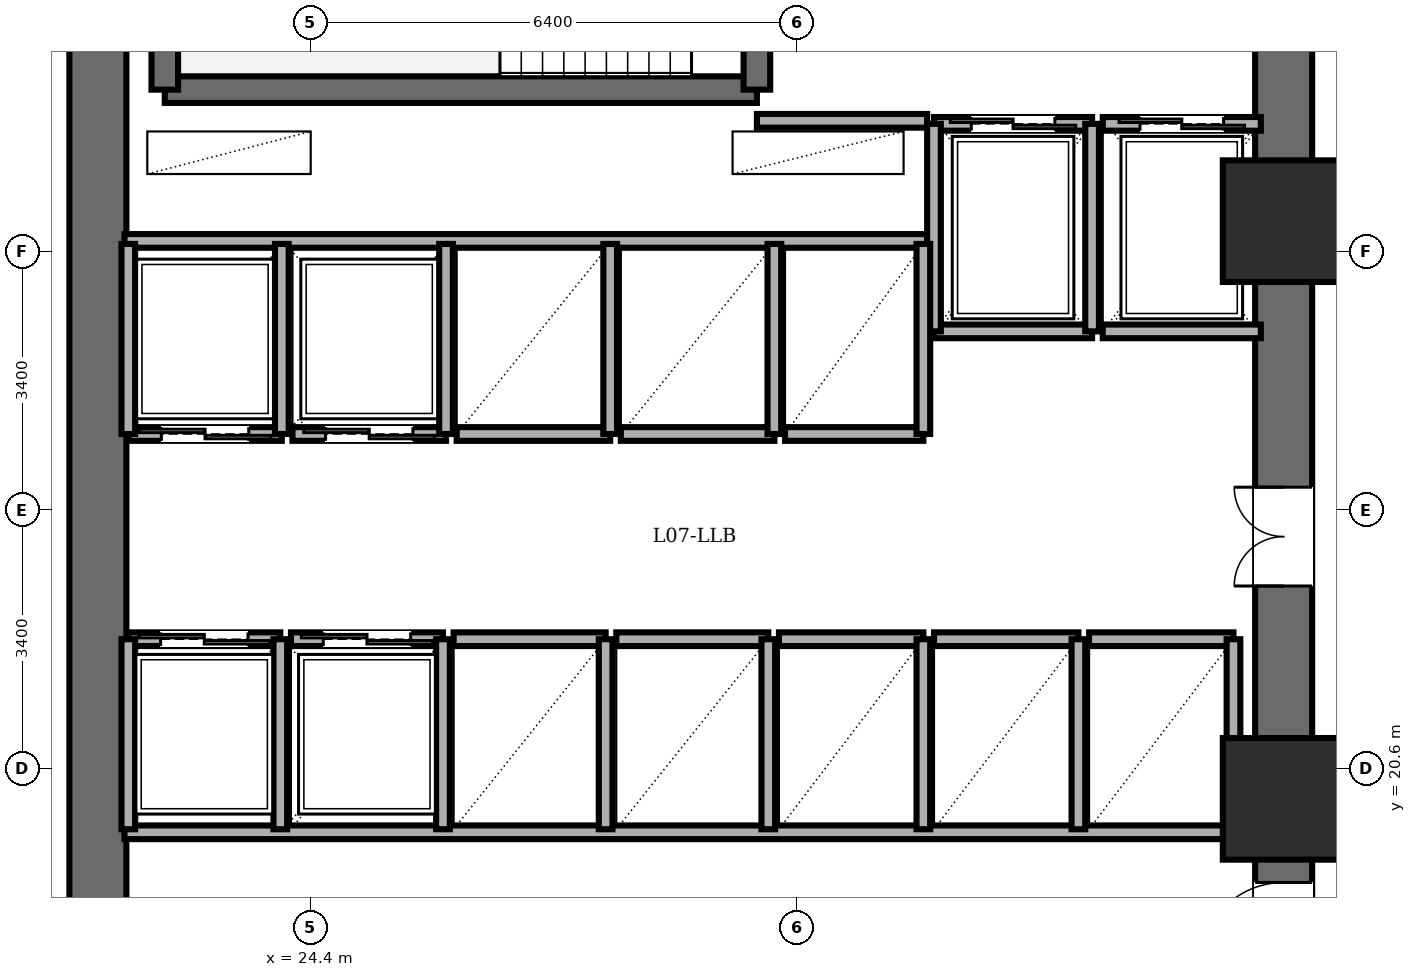
"""IFC4 building model, lengths in metres.
Left out: names, types, materials, properties, quantities, classifications, styles, units other than length and angle.
Written with IfcOpenShell. Run it as: python <this file> out.ifc"""

import sys

from ifc_helpers import new_model, si_unit, direction, frame, frame_2d, origin, origin_2d, place, context, subcontext, project, spatial, rectangle, extrude, element, fill, save


model = new_model("IFC4")
c1 = context("Model", 3, precision=1e-05, world=origin(), true_north=direction((0.0, 1.0)))
c2 = subcontext(c1, "Body", "Model", "MODEL_VIEW")
j1 = project(units=[si_unit("LENGTHUNIT", "METRE"), si_unit("PLANEANGLEUNIT", "RADIAN")], contexts=[c1])
p1 = place(None, origin())
s1 = spatial("IfcSite", under=j1, at=p1, CompositionType="ELEMENT")
p2 = place(p1, origin())
s2 = spatial("IfcBuilding", under=s1, at=p2, CompositionType="ELEMENT")
p3 = place(p2, frame((0.0, 0.0, 28.8)))
s3 = spatial("IfcBuildingStorey", under=s2, at=p3, CompositionType="ELEMENT", Elevation=28.8)
for number, where, z_axis, x_axis in (
    (1, (37.2, 20.2, 0.0), (0.0, 0.0, 1.0), (1.0, 0.0, 0.0)),
    (2, (37.2, 27.8, 0.0), (0.0, 0.0, 1.0), (1.0, 0.0, 0.0)),
):
    element("IfcColumn", number, at=place(p3, frame(where, z_axis=z_axis, x_axis=x_axis)), inside=s3, PredefinedType="COLUMN", context=c2, shape_type="SweptSolid", body=[
        extrude(rectangle(XDim=1.6, YDim=1.6, at=origin_2d()), origin(), (0.0, 0.0, 1.0), 3.6),
    ])
p4 = place(p3, frame((21.6, 14.4, 0.0), z_axis=(0.0, 0.0, 1.0), x_axis=(0.0, 1.0, 0.0)))
e3 = element("IfcWall", 3, at=p4, inside=s3, PredefinedType="SHEAR", context=c2, shape_type="SweptSolid", body=[
    extrude(rectangle(XDim=19.2, YDim=0.75, at=frame_2d((9.6, 0.0))), origin(), (0.0, 0.0, 1.0), 3.4),
])
p5 = place(p3, frame((37.2, 14.4, 0.0), z_axis=(0.0, 0.0, 1.0), x_axis=(0.0, 1.0, 0.0)))
e4 = element("IfcWall", 4, at=p5, inside=s3, PredefinedType="SHEAR", context=c2, shape_type="SweptSolid", body=[
    extrude(rectangle(XDim=19.2, YDim=0.75, at=frame_2d((9.6, 0.0))), origin(), (0.0, 0.0, 1.0), 3.4),
])
p6 = place(p5, frame((15.8, 0.0, 0.0)))
e5 = element("IfcOpeningElement", 5, at=p6, cuts=e4, PredefinedType="OPENING", context=c2, shape_type="SweptSolid", body=[
    extrude(rectangle(XDim=1.15, YDim=2.15, at=frame_2d((0.575, 1.075))), frame((0.0, 0.385, 0.0), z_axis=(0.0, -1.0, 0.0), x_axis=(1.0, 0.0, 0.0)), (0.0, 0.0, 1.0), 0.77),
])
p7 = place(p5, frame((3.6, 0.0, 0.0)))
e6 = element("IfcOpeningElement", 6, at=p7, cuts=e4, PredefinedType="OPENING", context=c2, shape_type="SweptSolid", body=[
    extrude(rectangle(XDim=1.1, YDim=2.15, at=frame_2d((0.55, 1.075))), frame((0.0, 0.385, 0.0), z_axis=(0.0, -1.0, 0.0), x_axis=(1.0, 0.0, 0.0)), (0.0, 0.0, 1.0), 0.77),
])
p8 = place(p5, frame((8.6, 0.0, 0.0)))
e7 = element("IfcOpeningElement", 7, at=p8, cuts=e4, PredefinedType="OPENING", context=c2, shape_type="SweptSolid", body=[
    extrude(rectangle(XDim=1.3, YDim=2.2, at=frame_2d((0.65, 1.1))), frame((0.0, 0.385, 0.0), z_axis=(0.0, -1.0, 0.0), x_axis=(1.0, 0.0, 0.0)), (0.0, 0.0, 1.0), 0.77),
])
p9 = place(p3, frame((22.48, 29.53, 0.0), z_axis=(0.0, 0.0, 1.0), x_axis=(1.0, 0.0, 0.0)))
e8 = element("IfcWall", 8, at=p9, inside=s3, PredefinedType="SOLIDWALL", context=c2, shape_type="SweptSolid", body=[
    extrude(rectangle(XDim=7.79, YDim=0.35, at=frame_2d((3.895, 0.0))), origin(), (0.0, 0.0, 1.0), 3.4),
])
p10 = place(p3, frame((22.48, 29.53, 0.0), z_axis=(0.0, 0.0, 1.0), x_axis=(0.0, 1.0, 0.0)))
e9 = element("IfcWall", 9, at=p10, inside=s3, PredefinedType="SOLIDWALL", context=c2, shape_type="SweptSolid", body=[
    extrude(rectangle(XDim=3.58, YDim=0.35, at=frame_2d((1.79, 0.0))), origin(), (0.0, 0.0, 1.0), 3.4),
])
p11 = place(p3, frame((30.27, 29.53, 0.0), z_axis=(0.0, 0.0, 1.0), x_axis=(0.0, 1.0, 0.0)))
e10 = element("IfcWall", 10, at=p11, inside=s3, PredefinedType="SOLIDWALL", context=c2, shape_type="SweptSolid", body=[
    extrude(rectangle(XDim=3.58, YDim=0.35, at=frame_2d((1.79, 0.0))), origin(), (0.0, 0.0, 1.0), 3.4),
])
p12 = place(p11, frame((1.25, 0.0, 0.0)))
e11 = element("IfcOpeningElement", 11, at=p12, cuts=e10, PredefinedType="OPENING", context=c2, shape_type="SweptSolid", body=[
    extrude(rectangle(XDim=1.1, YDim=2.15, at=frame_2d((0.55, 1.075))), frame((0.0, 0.185, 0.0), z_axis=(0.0, -1.0, 0.0), x_axis=(1.0, 0.0, 0.0)), (0.0, 0.0, 1.0), 0.37),
])
p13 = place(p3, frame((30.27, 29.12, 0.0), z_axis=(0.0, 0.0, 1.0), x_axis=(1.0, 0.0, 0.0)))
e12 = element("IfcWall", 12, at=p13, inside=s3, PredefinedType="PARTITIONING", context=c2, shape_type="SweptSolid", body=[
    extrude(rectangle(XDim=2.24, YDim=0.18, at=frame_2d((1.12, 0.0))), origin(), (0.0, 0.0, 1.0), 3.4),
])
p14 = place(p3, frame((21.95, 27.54, 0.0), z_axis=(0.0, 0.0, 1.0), x_axis=(1.0, 0.0, 0.0)))
e13 = element("IfcWall", 13, at=p14, inside=s3, PredefinedType="PARTITIONING", context=c2, shape_type="SweptSolid", body=[
    extrude(rectangle(XDim=10.56, YDim=0.18, at=frame_2d((5.28, 0.0))), origin(), (0.0, 0.0, 1.0), 3.4),
])
p15 = place(p3, frame((21.95, 19.76, 0.0), z_axis=(0.0, 0.0, 1.0), x_axis=(1.0, 0.0, 0.0)))
e14 = element("IfcWall", 14, at=p15, inside=s3, PredefinedType="PARTITIONING", context=c2, shape_type="SweptSolid", body=[
    extrude(rectangle(XDim=14.87, YDim=0.18, at=frame_2d((7.435, 0.0))), origin(), (0.0, 0.0, 1.0), 3.4),
])
p16 = place(p3, frame((32.6, 29.08, 0.0), z_axis=(0.0, 0.0, 1.0), x_axis=(1.0, 0.0, 0.0)))
e15 = element("IfcWall", 15, at=p16, inside=s3, PredefinedType="PARTITIONING", context=c2, shape_type="SweptSolid", body=[
    extrude(rectangle(XDim=2.08, YDim=0.18, at=frame_2d((1.04, 0.0))), origin(), (0.0, 0.0, 1.0), 3.4),
])
p17 = place(p16, frame((0.49, 0.0, 0.0)))
e16 = element("IfcOpeningElement", 16, at=p17, cuts=e15, PredefinedType="OPENING", context=c2, shape_type="SweptSolid", body=[
    extrude(rectangle(XDim=1.1, YDim=2.2, at=frame_2d((0.55, 1.1))), frame((0.0, 0.1, 0.0), z_axis=(0.0, -1.0, 0.0), x_axis=(1.0, 0.0, 0.0)), (0.0, 0.0, 1.0), 0.2),
])
p18 = place(p3, frame((34.68, 26.35, 0.0), z_axis=(0.0, 0.0, 1.0), x_axis=(-1.0, 0.0, 0.0)))
e17 = element("IfcWall", 17, at=p18, inside=s3, PredefinedType="PARTITIONING", context=c2, shape_type="SweptSolid", body=[
    extrude(rectangle(XDim=2.08, YDim=0.18, at=frame_2d((1.04, 0.0))), origin(), (0.0, 0.0, 1.0), 3.4),
])
for number, where, z_axis, x_axis in (
    (18, (34.68, 26.35, 0.0), (0.0, 0.0, 1.0), (0.0, 1.0, 0.0)),
    (19, (32.6, 29.08, 0.0), (0.0, 0.0, 1.0), (0.0, -1.0, 0.0)),
):
    element("IfcWall", number, at=place(p3, frame(where, z_axis=z_axis, x_axis=x_axis)), inside=s3, PredefinedType="PARTITIONING", context=c2, shape_type="SweptSolid", body=[
        extrude(rectangle(XDim=2.73, YDim=0.18, at=frame_2d((1.365, 0.0))), origin(), (0.0, 0.0, 1.0), 3.4),
    ])
p19 = place(p3, frame((34.82, 29.08, 0.0), z_axis=(0.0, 0.0, 1.0), x_axis=(1.0, 0.0, 0.0)))
e20 = element("IfcWall", 20, at=p19, inside=s3, PredefinedType="PARTITIONING", context=c2, shape_type="SweptSolid", body=[
    extrude(rectangle(XDim=2.08, YDim=0.18, at=frame_2d((1.04, 0.0))), origin(), (0.0, 0.0, 1.0), 3.4),
])
p20 = place(p19, frame((0.49, 0.0, 0.0)))
e21 = element("IfcOpeningElement", 21, at=p20, cuts=e20, PredefinedType="OPENING", context=c2, shape_type="SweptSolid", body=[
    extrude(rectangle(XDim=1.1, YDim=2.2, at=frame_2d((0.55, 1.1))), frame((0.0, 0.1, 0.0), z_axis=(0.0, -1.0, 0.0), x_axis=(1.0, 0.0, 0.0)), (0.0, 0.0, 1.0), 0.2),
])
p21 = place(p3, frame((36.9, 26.35, 0.0), z_axis=(0.0, 0.0, 1.0), x_axis=(-1.0, 0.0, 0.0)))
e22 = element("IfcWall", 22, at=p21, inside=s3, PredefinedType="PARTITIONING", context=c2, shape_type="SweptSolid", body=[
    extrude(rectangle(XDim=2.08, YDim=0.18, at=frame_2d((1.04, 0.0))), origin(), (0.0, 0.0, 1.0), 3.4),
])
p22 = place(p3, frame((24.02, 25.0, 0.0), z_axis=(0.0, 0.0, 1.0), x_axis=(-1.0, 0.0, 0.0)))
e23 = element("IfcWall", 23, at=p22, inside=s3, PredefinedType="PARTITIONING", context=c2, shape_type="SweptSolid", body=[
    extrude(rectangle(XDim=2.02, YDim=0.18, at=frame_2d((1.01, 0.0))), origin(), (0.0, 0.0, 1.0), 3.4),
])
p23 = place(p22, frame((0.435, 0.0, 0.0)))
e24 = element("IfcOpeningElement", 24, at=p23, cuts=e23, PredefinedType="OPENING", context=c2, shape_type="SweptSolid", body=[
    extrude(rectangle(XDim=1.15, YDim=2.2, at=frame_2d((0.575, 1.1))), frame((0.0, 0.1, 0.0), z_axis=(0.0, -1.0, 0.0), x_axis=(1.0, 0.0, 0.0)), (0.0, 0.0, 1.0), 0.2),
])
for number, where, z_axis, x_axis in (
    (25, (24.02, 25.0, 0.0), (0.0, 0.0, 1.0), (0.0, 1.0, 0.0)),
    (26, (22.0, 27.5, 0.0), (0.0, 0.0, 1.0), (0.0, -1.0, 0.0)),
):
    element("IfcWall", number, at=place(p3, frame(where, z_axis=z_axis, x_axis=x_axis)), inside=s3, PredefinedType="PARTITIONING", context=c2, shape_type="SweptSolid", body=[
        extrude(rectangle(XDim=2.5, YDim=0.18, at=frame_2d((1.25, 0.0))), origin(), (0.0, 0.0, 1.0), 3.4),
    ])
p24 = place(p3, frame((26.18, 25.0, 0.0), z_axis=(0.0, 0.0, 1.0), x_axis=(-1.0, 0.0, 0.0)))
e27 = element("IfcWall", 27, at=p24, inside=s3, PredefinedType="PARTITIONING", context=c2, shape_type="SweptSolid", body=[
    extrude(rectangle(XDim=2.02, YDim=0.18, at=frame_2d((1.01, 0.0))), origin(), (0.0, 0.0, 1.0), 3.4),
])
p25 = place(p24, frame((0.435, 0.0, 0.0)))
e28 = element("IfcOpeningElement", 28, at=p25, cuts=e27, PredefinedType="OPENING", context=c2, shape_type="SweptSolid", body=[
    extrude(rectangle(XDim=1.15, YDim=2.2, at=frame_2d((0.575, 1.1))), frame((0.0, 0.1, 0.0), z_axis=(0.0, -1.0, 0.0), x_axis=(1.0, 0.0, 0.0)), (0.0, 0.0, 1.0), 0.2),
])
p26 = place(p3, frame((26.18, 25.0, 0.0), z_axis=(0.0, 0.0, 1.0), x_axis=(0.0, 1.0, 0.0)))
e29 = element("IfcWall", 29, at=p26, inside=s3, PredefinedType="PARTITIONING", context=c2, shape_type="SweptSolid", body=[
    extrude(rectangle(XDim=2.5, YDim=0.18, at=frame_2d((1.25, 0.0))), origin(), (0.0, 0.0, 1.0), 3.4),
])
p27 = place(p3, frame((22.0, 22.3, 0.0), z_axis=(0.0, 0.0, 1.0), x_axis=(1.0, 0.0, 0.0)))
e30 = element("IfcWall", 30, at=p27, inside=s3, PredefinedType="PARTITIONING", context=c2, shape_type="SweptSolid", body=[
    extrude(rectangle(XDim=2.0, YDim=0.18, at=frame_2d((1.0, 0.0))), origin(), (0.0, 0.0, 1.0), 3.4),
])
p28 = place(p27, frame((0.425, 0.0, 0.0)))
e31 = element("IfcOpeningElement", 31, at=p28, cuts=e30, PredefinedType="OPENING", context=c2, shape_type="SweptSolid", body=[
    extrude(rectangle(XDim=1.15, YDim=2.2, at=frame_2d((0.575, 1.1))), frame((0.0, 0.1, 0.0), z_axis=(0.0, -1.0, 0.0), x_axis=(1.0, 0.0, 0.0)), (0.0, 0.0, 1.0), 0.2),
])
for number, where, z_axis, x_axis in (
    (32, (24.0, 19.8, 0.0), (0.0, 0.0, 1.0), (0.0, 1.0, 0.0)),
    (33, (22.0, 22.3, 0.0), (0.0, 0.0, 1.0), (0.0, -1.0, 0.0)),
):
    element("IfcWall", number, at=place(p3, frame(where, z_axis=z_axis, x_axis=x_axis)), inside=s3, PredefinedType="PARTITIONING", context=c2, shape_type="SweptSolid", body=[
        extrude(rectangle(XDim=2.5, YDim=0.18, at=frame_2d((1.25, 0.0))), origin(), (0.0, 0.0, 1.0), 3.4),
    ])
p29 = place(p3, frame((24.14, 22.3, 0.0), z_axis=(0.0, 0.0, 1.0), x_axis=(1.0, 0.0, 0.0)))
e34 = element("IfcWall", 34, at=p29, inside=s3, PredefinedType="PARTITIONING", context=c2, shape_type="SweptSolid", body=[
    extrude(rectangle(XDim=2.0, YDim=0.18, at=frame_2d((1.0, 0.0))), origin(), (0.0, 0.0, 1.0), 3.4),
])
p30 = place(p29, frame((0.425, 0.0, 0.0)))
e35 = element("IfcOpeningElement", 35, at=p30, cuts=e34, PredefinedType="OPENING", context=c2, shape_type="SweptSolid", body=[
    extrude(rectangle(XDim=1.15, YDim=2.2, at=frame_2d((0.575, 1.1))), frame((0.0, 0.1, 0.0), z_axis=(0.0, -1.0, 0.0), x_axis=(1.0, 0.0, 0.0)), (0.0, 0.0, 1.0), 0.2),
])
p31 = place(p3, frame((26.14, 19.8, 0.0), z_axis=(0.0, 0.0, 1.0), x_axis=(0.0, 1.0, 0.0)))
e36 = element("IfcWall", 36, at=p31, inside=s3, PredefinedType="PARTITIONING", context=c2, shape_type="SweptSolid", body=[
    extrude(rectangle(XDim=2.5, YDim=0.18, at=frame_2d((1.25, 0.0))), origin(), (0.0, 0.0, 1.0), 3.4),
])
p32 = place(p3, frame((28.34, 25.0, 0.0), z_axis=(0.0, 0.0, 1.0), x_axis=(-1.0, 0.0, 0.0)))
e37 = element("IfcWall", 37, at=p32, inside=s3, PredefinedType="PARTITIONING", context=c2, shape_type="SweptSolid", body=[
    extrude(rectangle(XDim=2.02, YDim=0.18, at=frame_2d((1.01, 0.0))), origin(), (0.0, 0.0, 1.0), 3.4),
])
p33 = place(p3, frame((28.34, 25.0, 0.0), z_axis=(0.0, 0.0, 1.0), x_axis=(0.0, 1.0, 0.0)))
e38 = element("IfcWall", 38, at=p33, inside=s3, PredefinedType="PARTITIONING", context=c2, shape_type="SweptSolid", body=[
    extrude(rectangle(XDim=2.5, YDim=0.18, at=frame_2d((1.25, 0.0))), origin(), (0.0, 0.0, 1.0), 3.4),
])
p34 = place(p3, frame((30.5, 25.0, 0.0), z_axis=(0.0, 0.0, 1.0), x_axis=(-1.0, 0.0, 0.0)))
e39 = element("IfcWall", 39, at=p34, inside=s3, PredefinedType="PARTITIONING", context=c2, shape_type="SweptSolid", body=[
    extrude(rectangle(XDim=2.02, YDim=0.18, at=frame_2d((1.01, 0.0))), origin(), (0.0, 0.0, 1.0), 3.4),
])
p35 = place(p3, frame((30.5, 25.0, 0.0), z_axis=(0.0, 0.0, 1.0), x_axis=(0.0, 1.0, 0.0)))
e40 = element("IfcWall", 40, at=p35, inside=s3, PredefinedType="PARTITIONING", context=c2, shape_type="SweptSolid", body=[
    extrude(rectangle(XDim=2.5, YDim=0.18, at=frame_2d((1.25, 0.0))), origin(), (0.0, 0.0, 1.0), 3.4),
])
p36 = place(p3, frame((26.28, 22.3, 0.0), z_axis=(0.0, 0.0, 1.0), x_axis=(1.0, 0.0, 0.0)))
e41 = element("IfcWall", 41, at=p36, inside=s3, PredefinedType="PARTITIONING", context=c2, shape_type="SweptSolid", body=[
    extrude(rectangle(XDim=2.0, YDim=0.18, at=frame_2d((1.0, 0.0))), origin(), (0.0, 0.0, 1.0), 3.4),
])
p37 = place(p3, frame((28.28, 19.8, 0.0), z_axis=(0.0, 0.0, 1.0), x_axis=(0.0, 1.0, 0.0)))
e42 = element("IfcWall", 42, at=p37, inside=s3, PredefinedType="PARTITIONING", context=c2, shape_type="SweptSolid", body=[
    extrude(rectangle(XDim=2.5, YDim=0.18, at=frame_2d((1.25, 0.0))), origin(), (0.0, 0.0, 1.0), 3.4),
])
p38 = place(p3, frame((28.42, 22.3, 0.0), z_axis=(0.0, 0.0, 1.0), x_axis=(1.0, 0.0, 0.0)))
e43 = element("IfcWall", 43, at=p38, inside=s3, PredefinedType="PARTITIONING", context=c2, shape_type="SweptSolid", body=[
    extrude(rectangle(XDim=2.0, YDim=0.18, at=frame_2d((1.0, 0.0))), origin(), (0.0, 0.0, 1.0), 3.4),
])
p39 = place(p3, frame((30.42, 19.8, 0.0), z_axis=(0.0, 0.0, 1.0), x_axis=(0.0, 1.0, 0.0)))
e44 = element("IfcWall", 44, at=p39, inside=s3, PredefinedType="PARTITIONING", context=c2, shape_type="SweptSolid", body=[
    extrude(rectangle(XDim=2.5, YDim=0.18, at=frame_2d((1.25, 0.0))), origin(), (0.0, 0.0, 1.0), 3.4),
])
p40 = place(p3, frame((32.46, 25.0, 0.0), z_axis=(0.0, 0.0, 1.0), x_axis=(-1.0, 0.0, 0.0)))
e45 = element("IfcWall", 45, at=p40, inside=s3, PredefinedType="PARTITIONING", context=c2, shape_type="SweptSolid", body=[
    extrude(rectangle(XDim=1.82, YDim=0.18, at=frame_2d((0.91, 0.0))), origin(), (0.0, 0.0, 1.0), 3.4),
])
p41 = place(p3, frame((32.46, 25.0, 0.0), z_axis=(0.0, 0.0, 1.0), x_axis=(0.0, 1.0, 0.0)))
e46 = element("IfcWall", 46, at=p41, inside=s3, PredefinedType="PARTITIONING", context=c2, shape_type="SweptSolid", body=[
    extrude(rectangle(XDim=2.5, YDim=0.18, at=frame_2d((1.25, 0.0))), origin(), (0.0, 0.0, 1.0), 3.4),
])
p42 = place(p3, frame((30.56, 22.3, 0.0), z_axis=(0.0, 0.0, 1.0), x_axis=(1.0, 0.0, 0.0)))
e47 = element("IfcWall", 47, at=p42, inside=s3, PredefinedType="PARTITIONING", context=c2, shape_type="SweptSolid", body=[
    extrude(rectangle(XDim=1.9, YDim=0.18, at=frame_2d((0.95, 0.0))), origin(), (0.0, 0.0, 1.0), 3.4),
])
p43 = place(p3, frame((32.46, 19.8, 0.0), z_axis=(0.0, 0.0, 1.0), x_axis=(0.0, 1.0, 0.0)))
e48 = element("IfcWall", 48, at=p43, inside=s3, PredefinedType="PARTITIONING", context=c2, shape_type="SweptSolid", body=[
    extrude(rectangle(XDim=2.5, YDim=0.18, at=frame_2d((1.25, 0.0))), origin(), (0.0, 0.0, 1.0), 3.4),
])
p44 = place(p3, frame((32.6, 22.3, 0.0), z_axis=(0.0, 0.0, 1.0), x_axis=(1.0, 0.0, 0.0)))
e49 = element("IfcWall", 49, at=p44, inside=s3, PredefinedType="PARTITIONING", context=c2, shape_type="SweptSolid", body=[
    extrude(rectangle(XDim=1.9, YDim=0.18, at=frame_2d((0.95, 0.0))), origin(), (0.0, 0.0, 1.0), 3.4),
])
p45 = place(p3, frame((34.5, 19.8, 0.0), z_axis=(0.0, 0.0, 1.0), x_axis=(0.0, 1.0, 0.0)))
e50 = element("IfcWall", 50, at=p45, inside=s3, PredefinedType="PARTITIONING", context=c2, shape_type="SweptSolid", body=[
    extrude(rectangle(XDim=2.5, YDim=0.18, at=frame_2d((1.25, 0.0))), origin(), (0.0, 0.0, 1.0), 3.4),
])
p46 = place(p3, frame((34.64, 22.3, 0.0), z_axis=(0.0, 0.0, 1.0), x_axis=(1.0, 0.0, 0.0)))
e51 = element("IfcWall", 51, at=p46, inside=s3, PredefinedType="PARTITIONING", context=c2, shape_type="SweptSolid", body=[
    extrude(rectangle(XDim=1.9, YDim=0.18, at=frame_2d((0.95, 0.0))), origin(), (0.0, 0.0, 1.0), 3.4),
])
p47 = place(p3, frame((36.54, 19.8, 0.0), z_axis=(0.0, 0.0, 1.0), x_axis=(0.0, 1.0, 0.0)))
e52 = element("IfcWall", 52, at=p47, inside=s3, PredefinedType="PARTITIONING", context=c2, shape_type="SweptSolid", body=[
    extrude(rectangle(XDim=2.5, YDim=0.18, at=frame_2d((1.25, 0.0))), origin(), (0.0, 0.0, 1.0), 3.4),
])
p48 = place(p7, origin())
e53 = element("IfcDoor", 53, at=p48, inside=s3, OperationType="SINGLE_SWING_LEFT", PredefinedType="DOOR", context=c2, shape_type="SweptSolid", body=[
    extrude(rectangle(XDim=1.1, YDim=2.15, at=frame_2d((0.55, 1.075))), frame((0.0, 0.025, 0.0), z_axis=(0.0, -1.0, 0.0), x_axis=(1.0, 0.0, 0.0)), (0.0, 0.0, 1.0), 0.05),
])
fill(e6, e53)
p49 = place(p17, origin())
e54 = element("IfcDoor", 54, at=p49, inside=s3, OperationType="DOUBLE_DOOR_SLIDING", PredefinedType="DOOR", context=c2, shape_type="SweptSolid", body=[
    extrude(rectangle(XDim=1.1, YDim=2.2, at=frame_2d((0.55, 1.1))), frame((0.0, 0.025, 0.0), z_axis=(0.0, -1.0, 0.0), x_axis=(1.0, 0.0, 0.0)), (0.0, 0.0, 1.0), 0.05),
])
fill(e16, e54)
p50 = place(p20, origin())
e55 = element("IfcDoor", 55, at=p50, inside=s3, OperationType="DOUBLE_DOOR_SLIDING", PredefinedType="DOOR", context=c2, shape_type="SweptSolid", body=[
    extrude(rectangle(XDim=1.1, YDim=2.2, at=frame_2d((0.55, 1.1))), frame((0.0, 0.025, 0.0), z_axis=(0.0, -1.0, 0.0), x_axis=(1.0, 0.0, 0.0)), (0.0, 0.0, 1.0), 0.05),
])
fill(e21, e55)
p51 = place(p23, origin())
e56 = element("IfcDoor", 56, at=p51, inside=s3, OperationType="DOUBLE_DOOR_SLIDING", PredefinedType="DOOR", context=c2, shape_type="SweptSolid", body=[
    extrude(rectangle(XDim=1.15, YDim=2.2, at=frame_2d((0.575, 1.1))), frame((0.0, 0.025, 0.0), z_axis=(0.0, -1.0, 0.0), x_axis=(1.0, 0.0, 0.0)), (0.0, 0.0, 1.0), 0.05),
])
fill(e24, e56)
p52 = place(p25, origin())
e57 = element("IfcDoor", 57, at=p52, inside=s3, OperationType="DOUBLE_DOOR_SLIDING", PredefinedType="DOOR", context=c2, shape_type="SweptSolid", body=[
    extrude(rectangle(XDim=1.15, YDim=2.2, at=frame_2d((0.575, 1.1))), frame((0.0, 0.025, 0.0), z_axis=(0.0, -1.0, 0.0), x_axis=(1.0, 0.0, 0.0)), (0.0, 0.0, 1.0), 0.05),
])
fill(e28, e57)
p53 = place(p28, origin())
e58 = element("IfcDoor", 58, at=p53, inside=s3, OperationType="DOUBLE_DOOR_SLIDING", PredefinedType="DOOR", context=c2, shape_type="SweptSolid", body=[
    extrude(rectangle(XDim=1.15, YDim=2.2, at=frame_2d((0.575, 1.1))), frame((0.0, 0.025, 0.0), z_axis=(0.0, -1.0, 0.0), x_axis=(1.0, 0.0, 0.0)), (0.0, 0.0, 1.0), 0.05),
])
fill(e31, e58)
p54 = place(p30, origin())
e59 = element("IfcDoor", 59, at=p54, inside=s3, OperationType="DOUBLE_DOOR_SLIDING", PredefinedType="DOOR", context=c2, shape_type="SweptSolid", body=[
    extrude(rectangle(XDim=1.15, YDim=2.2, at=frame_2d((0.575, 1.1))), frame((0.0, 0.025, 0.0), z_axis=(0.0, -1.0, 0.0), x_axis=(1.0, 0.0, 0.0)), (0.0, 0.0, 1.0), 0.05),
])
fill(e35, e59)
p55 = place(p8, origin())
e60 = element("IfcDoor", 60, at=p55, inside=s3, OperationType="DOUBLE_DOOR_SINGLE_SWING", PredefinedType="DOOR", context=c2, shape_type="SweptSolid", body=[
    extrude(rectangle(XDim=1.3, YDim=2.2, at=frame_2d((0.65, 1.1))), frame((0.0, 0.025, 0.0), z_axis=(0.0, -1.0, 0.0), x_axis=(1.0, 0.0, 0.0)), (0.0, 0.0, 1.0), 0.05),
])
fill(e7, e60)
save(model, sys.argv[1])
